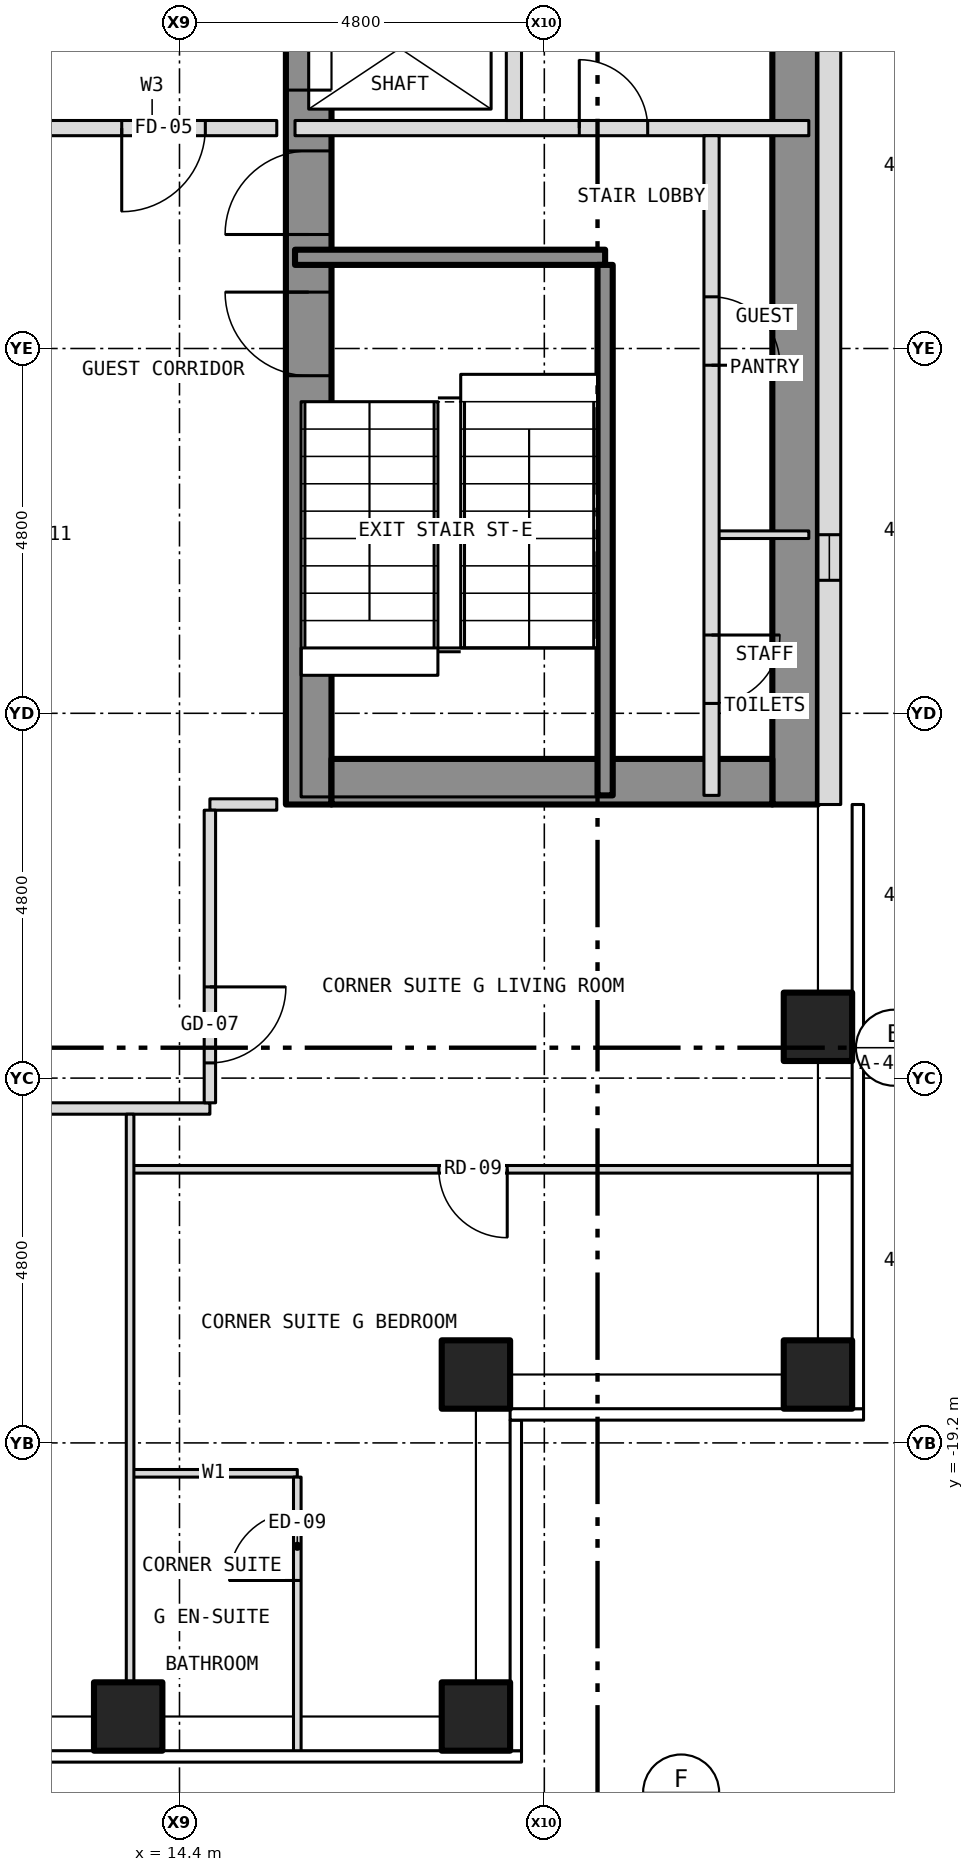
"""IFC4 building model, lengths in metres.
Left out: names, types, materials, properties, quantities, classifications, styles, units other than length and angle.
Written with IfcOpenShell. Run it as: python <this file> out.ifc"""

import sys

from ifc_helpers import new_model, si_unit, direction, frame, frame_2d, origin, origin_2d, place, context, subcontext, project, spatial, rectangle, hollow_rectangle, extrude, element, fill, save


model = new_model("IFC4")
c1 = context("Model", 3, precision=1e-05, world=origin(), true_north=direction((0.0, 1.0)))
c2 = subcontext(c1, "Body", "Model", "MODEL_VIEW")
j1 = project(units=[si_unit("LENGTHUNIT", "METRE"), si_unit("PLANEANGLEUNIT", "RADIAN")], contexts=[c1])
p1 = place(None, origin())
s1 = spatial("IfcSite", under=j1, at=p1, CompositionType="ELEMENT")
p2 = place(p1, origin())
s2 = spatial("IfcBuilding", under=s1, at=p2, CompositionType="ELEMENT")
p3 = place(p2, frame((0.0, 0.0, 117.0)))
s3 = spatial("IfcBuildingStorey", under=s2, at=p3, CompositionType="ELEMENT", Elevation=117.0)
for number, where, z_axis, x_axis in (
    (1, (13.725, -22.8, -0.15), (0.0, 0.0, 1.0), (1.0, 0.0, 0.0)),
    (2, (18.3, -22.8, -0.15), (0.0, 0.0, 1.0), (1.0, 0.0, 0.0)),
    (3, (22.8, -18.3, -0.15), (0.0, 0.0, 1.0), (1.0, 0.0, 0.0)),
    (4, (22.8, -13.725, -0.15), (0.0, 0.0, 1.0), (1.0, 0.0, 0.0)),
    (5, (18.3, -18.3, -0.15), (0.0, 0.0, 1.0), (1.0, 0.0, 0.0)),
):
    element("IfcColumn", number, at=place(p3, frame(where, z_axis=z_axis, x_axis=x_axis)), inside=s3, PredefinedType="COLUMN", context=c2, shape_type="SweptSolid", body=[
        extrude(hollow_rectangle(XDim=0.9, YDim=0.9, WallThickness=0.05, at=origin_2d()), origin(), (0.0, 0.0, 1.0), 3.5),
    ])
p4 = place(p3, frame((16.1, -10.8, 0.0), z_axis=(0.0, 0.0, 1.0), x_axis=(0.0, 1.0, 0.0)))
e6 = element("IfcWall", 6, at=p4, inside=s3, PredefinedType="SHEAR", context=c2, shape_type="SweptSolid", body=[
    extrude(rectangle(XDim=21.6, YDim=0.6, at=frame_2d((10.8, 0.0))), origin(), (0.0, 0.0, 1.0), 3.25),
])
p5 = place(p4, frame((9.4, 0.0, 0.0)))
e7 = element("IfcOpeningElement", 7, at=p5, cuts=e6, PredefinedType="OPENING", context=c2, shape_type="SweptSolid", body=[
    extrude(rectangle(XDim=1.1, YDim=2.1, at=frame_2d((0.55, 1.05))), frame((0.0, 0.312, 0.0), z_axis=(0.0, -1.0, 0.0), x_axis=(1.0, 0.0, 0.0)), (0.0, 0.0, 1.0), 0.624),
])
p6 = place(p4, frame((11.5, 0.0, 0.0)))
e8 = element("IfcOpeningElement", 8, at=p6, cuts=e6, PredefinedType="OPENING", context=c2, shape_type="SweptSolid", body=[
    extrude(rectangle(XDim=1.1, YDim=2.1, at=frame_2d((0.55, 1.05))), frame((0.0, 0.312, 0.0), z_axis=(0.0, -1.0, 0.0), x_axis=(1.0, 0.0, 0.0)), (0.0, 0.0, 1.0), 0.624),
])
p7 = place(p4, frame((13.6, 0.0, 0.0)))
e9 = element("IfcOpeningElement", 9, at=p7, cuts=e6, PredefinedType="OPENING", context=c2, shape_type="SweptSolid", body=[
    extrude(rectangle(XDim=1.1, YDim=2.1, at=frame_2d((0.55, 1.05))), frame((0.0, 0.312, 0.0), z_axis=(0.0, -1.0, 0.0), x_axis=(1.0, 0.0, 0.0)), (0.0, 0.0, 1.0), 0.624),
])
p8 = place(p4, frame((15.7, 0.0, 0.0)))
e10 = element("IfcOpeningElement", 10, at=p8, cuts=e6, PredefinedType="OPENING", context=c2, shape_type="SweptSolid", body=[
    extrude(rectangle(XDim=1.1, YDim=2.1, at=frame_2d((0.55, 1.05))), frame((0.0, 0.312, 0.0), z_axis=(0.0, -1.0, 0.0), x_axis=(1.0, 0.0, 0.0)), (0.0, 0.0, 1.0), 0.624),
])
p9 = place(p4, frame((17.8, 0.0, 0.0)))
e11 = element("IfcOpeningElement", 11, at=p9, cuts=e6, PredefinedType="OPENING", context=c2, shape_type="SweptSolid", body=[
    extrude(rectangle(XDim=1.1, YDim=2.1, at=frame_2d((0.55, 1.05))), frame((0.0, 0.312, 0.0), z_axis=(0.0, -1.0, 0.0), x_axis=(1.0, 0.0, 0.0)), (0.0, 0.0, 1.0), 0.624),
])
p10 = place(p4, frame((5.642, 0.0, 0.0)))
e12 = element("IfcOpeningElement", 12, at=p10, cuts=e6, PredefinedType="OPENING", context=c2, shape_type="SweptSolid", body=[
    extrude(rectangle(XDim=1.1, YDim=2.1, at=frame_2d((0.55, 1.05))), frame((0.0, 0.312, 0.0), z_axis=(0.0, -1.0, 0.0), x_axis=(1.0, 0.0, 0.0)), (0.0, 0.0, 1.0), 0.624),
])
p11 = place(p4, frame((7.5, 0.0, 0.0)))
e13 = element("IfcOpeningElement", 13, at=p11, cuts=e6, PredefinedType="OPENING", context=c2, shape_type="SweptSolid", body=[
    extrude(rectangle(XDim=1.1, YDim=2.1, at=frame_2d((0.55, 1.05))), frame((0.0, 0.312, 0.0), z_axis=(0.0, -1.0, 0.0), x_axis=(1.0, 0.0, 0.0)), (0.0, 0.0, 1.0), 0.624),
])
p12 = place(p3, frame((22.5, -10.8, 0.0), z_axis=(0.0, 0.0, 1.0), x_axis=(0.0, 1.0, 0.0)))
e14 = element("IfcWall", 14, at=p12, inside=s3, PredefinedType="SHEAR", context=c2, shape_type="SweptSolid", body=[
    extrude(rectangle(XDim=21.6, YDim=0.6, at=frame_2d((10.8, 0.0))), origin(), (0.0, 0.0, 1.0), 3.25),
])
p13 = place(p3, frame((16.4, -10.5, 0.0), z_axis=(0.0, 0.0, 1.0), x_axis=(1.0, 0.0, 0.0)))
e15 = element("IfcWall", 15, at=p13, inside=s3, PredefinedType="SHEAR", context=c2, shape_type="SweptSolid", body=[
    extrude(rectangle(XDim=5.8, YDim=0.6, at=frame_2d((2.9, 0.0))), origin(), (0.0, 0.0, 1.0), 3.25),
])
p14 = place(p3, frame((22.95, -10.8, 0.0), z_axis=(0.0, 0.0, 1.0), x_axis=(0.0, 1.0, 0.0)))
e16 = element("IfcWall", 16, at=p14, inside=s3, PredefinedType="SOLIDWALL", context=c2, shape_type="SweptSolid", body=[
    extrude(rectangle(XDim=21.6, YDim=0.3, at=frame_2d((10.8, 0.0))), origin(), (0.0, 0.0, 1.0), 3.5),
])
p15 = place(p14, frame((2.95, 0.0, 1.0)))
e17 = element("IfcOpeningElement", 17, at=p15, cuts=e16, PredefinedType="OPENING", context=c2, shape_type="SweptSolid", body=[
    extrude(rectangle(XDim=0.6, YDim=1.5, at=frame_2d((0.3, 0.75))), frame((0.0, 0.162, 0.0), z_axis=(0.0, -1.0, 0.0), x_axis=(1.0, 0.0, 0.0)), (0.0, 0.0, 1.0), 0.324),
])
p16 = place(p3, frame((13.75, -19.6, 0.0), z_axis=(0.0, 0.0, 1.0), x_axis=(1.0, 0.0, 0.0)))
e18 = element("IfcWall", 18, at=p16, inside=s3, PredefinedType="PARTITIONING", context=c2, shape_type="SweptSolid", body=[
    extrude(rectangle(XDim=2.2, YDim=0.1, at=frame_2d((1.1, 0.0))), origin(), (0.0, 0.0, 1.0), 3.35),
])
p17 = place(p3, frame((13.75, -15.6, 0.0), z_axis=(0.0, 0.0, 1.0), x_axis=(1.0, 0.0, 0.0)))
e19 = element("IfcWall", 19, at=p17, inside=s3, PredefinedType="PARTITIONING", context=c2, shape_type="SweptSolid", body=[
    extrude(rectangle(XDim=9.53, YDim=0.1, at=frame_2d((4.765, 0.0))), origin(), (0.0, 0.0, 1.0), 3.35),
])
p18 = place(p17, frame((4.062, 0.0, 0.0)))
e20 = element("IfcOpeningElement", 20, at=p18, cuts=e19, PredefinedType="OPENING", context=c2, shape_type="SweptSolid", body=[
    extrude(rectangle(XDim=0.9, YDim=2.1, at=frame_2d((0.45, 1.05))), frame((0.0, 0.062, 0.0), z_axis=(0.0, -1.0, 0.0), x_axis=(1.0, 0.0, 0.0)), (0.0, 0.0, 1.0), 0.124),
])
p19 = place(p3, frame((7.95, -14.8, 0.0), z_axis=(0.0, 0.0, 1.0), x_axis=(1.0, 0.0, 0.0)))
e21 = element("IfcWall", 21, at=p19, inside=s3, PredefinedType="PARTITIONING", context=c2, shape_type="SweptSolid", body=[
    extrude(rectangle(XDim=6.85, YDim=0.15, at=frame_2d((3.425, 0.0))), origin(), (0.0, 0.0, 1.0), 3.35),
])
p20 = place(p19, frame((3.487, 0.0, 0.0)))
e22 = element("IfcOpeningElement", 22, at=p20, cuts=e21, PredefinedType="OPENING", context=c2, shape_type="SweptSolid", body=[
    extrude(rectangle(XDim=1.0, YDim=2.1, at=frame_2d((0.5, 1.05))), frame((0.0, 0.087, 0.0), z_axis=(0.0, -1.0, 0.0), x_axis=(1.0, 0.0, 0.0)), (0.0, 0.0, 1.0), 0.174),
])
p21 = place(p3, frame((14.8, -10.8, 0.0), z_axis=(0.0, 0.0, 1.0), x_axis=(1.0, 0.0, 0.0)))
e23 = element("IfcWall", 23, at=p21, inside=s3, PredefinedType="PARTITIONING", context=c2, shape_type="SweptSolid", body=[
    extrude(rectangle(XDim=0.88, YDim=0.15, at=frame_2d((0.44, 0.0))), origin(), (0.0, 0.0, 1.0), 3.35),
])
p22 = place(p3, frame((21.4, -7.25, 0.0), z_axis=(0.0, 0.0, 1.0), x_axis=(1.0, 0.0, 0.0)))
e24 = element("IfcWall", 24, at=p22, inside=s3, PredefinedType="PARTITIONING", context=c2, shape_type="SweptSolid", body=[
    extrude(rectangle(XDim=1.28, YDim=0.1, at=frame_2d((0.64, 0.0))), origin(), (0.0, 0.0, 1.0), 3.25),
])
p23 = place(p3, frame((15.92, -3.6, 0.0), z_axis=(0.0, 0.0, 1.0), x_axis=(1.0, 0.0, 0.0)))
e25 = element("IfcWall", 25, at=p23, inside=s3, PredefinedType="SHEAR", context=c2, shape_type="SweptSolid", body=[
    extrude(rectangle(XDim=4.08, YDim=0.2, at=frame_2d((2.04, 0.0))), origin(), (0.0, 0.0, 1.0), 3.25),
])
p24 = place(p3, frame((12.4, -1.9, 0.0), z_axis=(0.0, 0.0, 1.0), x_axis=(1.0, 0.0, 0.0)))
e26 = element("IfcWall", 26, at=p24, inside=s3, PredefinedType="PARTITIONING", context=c2, shape_type="SweptSolid", body=[
    extrude(rectangle(XDim=3.28, YDim=0.2, at=frame_2d((1.64, 0.0))), origin(), (0.0, 0.0, 1.0), 3.35),
])
p25 = place(p24, frame((1.24, 0.0, 0.0)))
e27 = element("IfcOpeningElement", 27, at=p25, cuts=e26, PredefinedType="OPENING", context=c2, shape_type="SweptSolid", body=[
    extrude(rectangle(XDim=1.1, YDim=2.1, at=frame_2d((0.55, 1.05))), frame((0.0, 0.112, 0.0), z_axis=(0.0, -1.0, 0.0), x_axis=(1.0, 0.0, 0.0)), (0.0, 0.0, 1.0), 0.224),
])
p26 = place(p3, frame((15.92, -1.9, 0.0), z_axis=(0.0, 0.0, 1.0), x_axis=(1.0, 0.0, 0.0)))
e28 = element("IfcWall", 28, at=p26, inside=s3, PredefinedType="PARTITIONING", context=c2, shape_type="SweptSolid", body=[
    extrude(rectangle(XDim=6.76, YDim=0.2, at=frame_2d((3.38, 0.0))), origin(), (0.0, 0.0, 1.0), 3.25),
])
p27 = place(p26, frame((3.74, 0.0, 0.0)))
e29 = element("IfcOpeningElement", 29, at=p27, cuts=e28, PredefinedType="OPENING", context=c2, shape_type="SweptSolid", body=[
    extrude(rectangle(XDim=0.9, YDim=2.1, at=frame_2d((0.45, 1.05))), frame((0.0, 0.112, 0.0), z_axis=(0.0, -1.0, 0.0), x_axis=(1.0, 0.0, 0.0)), (0.0, 0.0, 1.0), 0.224),
])
p28 = place(p3, frame((13.75, -22.68, 0.0), z_axis=(0.0, 0.0, 1.0), x_axis=(0.0, 1.0, 0.0)))
e30 = element("IfcWall", 30, at=p28, inside=s3, PredefinedType="PARTITIONING", context=c2, shape_type="SweptSolid", body=[
    extrude(rectangle(XDim=7.805, YDim=0.1, at=frame_2d((3.902, 0.0))), origin(), (0.0, 0.0, 1.0), 3.35),
])
p29 = place(p3, frame((14.8, -14.725, 0.0), z_axis=(0.0, 0.0, 1.0), x_axis=(0.0, 1.0, 0.0)))
e31 = element("IfcWall", 31, at=p29, inside=s3, PredefinedType="PARTITIONING", context=c2, shape_type="SweptSolid", body=[
    extrude(rectangle(XDim=3.85, YDim=0.15, at=frame_2d((1.925, 0.0))), origin(), (0.0, 0.0, 1.0), 3.35),
])
p30 = place(p29, frame((0.525, 0.0, 0.0)))
e32 = element("IfcOpeningElement", 32, at=p30, cuts=e31, PredefinedType="OPENING", context=c2, shape_type="SweptSolid", body=[
    extrude(rectangle(XDim=1.0, YDim=2.1, at=frame_2d((0.5, 1.05))), frame((0.0, 0.087, 0.0), z_axis=(0.0, -1.0, 0.0), x_axis=(1.0, 0.0, 0.0)), (0.0, 0.0, 1.0), 0.174),
])
p31 = place(p3, frame((15.95, -23.28, 0.0), z_axis=(0.0, 0.0, 1.0), x_axis=(0.0, 1.0, 0.0)))
e33 = element("IfcWall", 33, at=p31, inside=s3, PredefinedType="PARTITIONING", context=c2, shape_type="SweptSolid", body=[
    extrude(rectangle(XDim=3.63, YDim=0.1, at=frame_2d((1.815, 0.0))), origin(), (0.0, 0.0, 1.0), 3.35),
])
p32 = place(p31, frame((2.27, 0.0, 0.0)))
e34 = element("IfcOpeningElement", 34, at=p32, cuts=e33, PredefinedType="OPENING", context=c2, shape_type="SweptSolid", body=[
    extrude(rectangle(XDim=0.9, YDim=2.1, at=frame_2d((0.45, 1.05))), frame((0.0, 0.062, 0.0), z_axis=(0.0, -1.0, 0.0), x_axis=(1.0, 0.0, 0.0)), (0.0, 0.0, 1.0), 0.124),
])
p33 = place(p3, frame((18.8, -1.8, 0.0), z_axis=(0.0, 0.0, 1.0), x_axis=(0.0, 1.0, 0.0)))
e35 = element("IfcWall", 35, at=p33, inside=s3, PredefinedType="PARTITIONING", context=c2, shape_type="SweptSolid", body=[
    extrude(rectangle(XDim=12.48, YDim=0.2, at=frame_2d((6.24, 0.0))), origin(), (0.0, 0.0, 1.0), 3.25),
])
p34 = place(p3, frame((20.0, -10.68, 0.0), z_axis=(0.0, 0.0, 1.0), x_axis=(0.0, 1.0, 0.0)))
e36 = element("IfcWall", 36, at=p34, inside=s3, PredefinedType="SHEAR", context=c2, shape_type="SweptSolid", body=[
    extrude(rectangle(XDim=6.98, YDim=0.2, at=frame_2d((3.49, 0.0))), origin(), (0.0, 0.0, 1.0), 3.25),
])
p35 = place(p3, frame((21.4, -10.68, 0.0), z_axis=(0.0, 0.0, 1.0), x_axis=(0.0, 1.0, 0.0)))
e37 = element("IfcWall", 37, at=p35, inside=s3, PredefinedType="PARTITIONING", context=c2, shape_type="SweptSolid", body=[
    extrude(rectangle(XDim=8.68, YDim=0.2, at=frame_2d((4.34, 0.0))), origin(), (0.0, 0.0, 1.0), 3.25),
])
p36 = place(p35, frame((1.21, 0.0, 0.0)))
e38 = element("IfcOpeningElement", 38, at=p36, cuts=e37, PredefinedType="OPENING", context=c2, shape_type="SweptSolid", body=[
    extrude(rectangle(XDim=0.9, YDim=2.1, at=frame_2d((0.45, 1.05))), frame((0.0, 0.112, 0.0), z_axis=(0.0, -1.0, 0.0), x_axis=(1.0, 0.0, 0.0)), (0.0, 0.0, 1.0), 0.224),
])
p37 = place(p35, frame((5.66, 0.0, 0.0)))
e39 = element("IfcOpeningElement", 39, at=p37, cuts=e37, PredefinedType="OPENING", context=c2, shape_type="SweptSolid", body=[
    extrude(rectangle(XDim=0.9, YDim=2.1, at=frame_2d((0.45, 1.05))), frame((0.0, 0.112, 0.0), z_axis=(0.0, -1.0, 0.0), x_axis=(1.0, 0.0, 0.0)), (0.0, 0.0, 1.0), 0.224),
])
p38 = place(p15, origin())
e40 = element("IfcWindow", 40, at=p38, inside=s3, PartitioningType="SINGLE_PANEL", PredefinedType="WINDOW", context=c2, shape_type="SweptSolid", body=[
    extrude(rectangle(XDim=0.6, YDim=1.5, at=frame_2d((0.3, 0.75))), frame((0.0, -0.06, 0.0), z_axis=(0.0, -1.0, 0.0), x_axis=(1.0, 0.0, 0.0)), (0.0, 0.0, 1.0), 0.06),
])
fill(e17, e40)
p39 = place(p5, origin())
e41 = element("IfcDoor", 41, at=p39, inside=s3, OperationType="SLIDING_TO_LEFT", PredefinedType="DOOR", context=c2, shape_type="SweptSolid", body=[
    extrude(rectangle(XDim=1.1, YDim=2.1, at=frame_2d((0.55, 1.05))), frame((0.0, 0.025, 0.0), z_axis=(0.0, -1.0, 0.0), x_axis=(1.0, 0.0, 0.0)), (0.0, 0.0, 1.0), 0.05),
])
fill(e7, e41)
p40 = place(p10, origin())
e42 = element("IfcDoor", 42, at=p40, inside=s3, OperationType="SINGLE_SWING_RIGHT", PredefinedType="DOOR", context=c2, shape_type="SweptSolid", body=[
    extrude(rectangle(XDim=1.1, YDim=2.1, at=frame_2d((0.55, 1.05))), frame((0.0, 0.025, 0.0), z_axis=(0.0, -1.0, 0.0), x_axis=(1.0, 0.0, 0.0)), (0.0, 0.0, 1.0), 0.05),
])
fill(e12, e42)
p41 = place(p11, origin())
e43 = element("IfcDoor", 43, at=p41, inside=s3, OperationType="SINGLE_SWING_LEFT", PredefinedType="DOOR", context=c2, shape_type="SweptSolid", body=[
    extrude(rectangle(XDim=1.1, YDim=2.1, at=frame_2d((0.55, 1.05))), frame((0.0, 0.025, 0.0), z_axis=(0.0, -1.0, 0.0), x_axis=(1.0, 0.0, 0.0)), (0.0, 0.0, 1.0), 0.05),
])
fill(e13, e43)
p42 = place(p36, origin())
e44 = element("IfcDoor", 44, at=p42, inside=s3, OperationType="SINGLE_SWING_RIGHT", PredefinedType="DOOR", context=c2, shape_type="SweptSolid", body=[
    extrude(rectangle(XDim=0.9, YDim=2.1, at=frame_2d((0.45, 1.05))), frame((0.0, 0.025, 0.0), z_axis=(0.0, -1.0, 0.0), x_axis=(1.0, 0.0, 0.0)), (0.0, 0.0, 1.0), 0.05),
])
fill(e38, e44)
p43 = place(p37, origin())
e45 = element("IfcDoor", 45, at=p43, inside=s3, OperationType="SINGLE_SWING_LEFT", PredefinedType="DOOR", context=c2, shape_type="SweptSolid", body=[
    extrude(rectangle(XDim=0.9, YDim=2.1, at=frame_2d((0.45, 1.05))), frame((0.0, 0.025, 0.0), z_axis=(0.0, -1.0, 0.0), x_axis=(1.0, 0.0, 0.0)), (0.0, 0.0, 1.0), 0.05),
])
fill(e39, e45)
p44 = place(p27, origin())
e46 = element("IfcDoor", 46, at=p44, inside=s3, OperationType="SINGLE_SWING_LEFT", PredefinedType="DOOR", context=c2, shape_type="SweptSolid", body=[
    extrude(rectangle(XDim=0.9, YDim=2.1, at=frame_2d((0.45, 1.05))), frame((0.0, 0.025, 0.0), z_axis=(0.0, -1.0, 0.0), x_axis=(1.0, 0.0, 0.0)), (0.0, 0.0, 1.0), 0.05),
])
fill(e29, e46)
p45 = place(p25, origin())
e47 = element("IfcDoor", 47, at=p45, inside=s3, OperationType="SINGLE_SWING_LEFT", PredefinedType="DOOR", context=c2, shape_type="SweptSolid", body=[
    extrude(rectangle(XDim=1.1, YDim=2.1, at=frame_2d((0.55, 1.05))), frame((0.0, 0.025, 0.0), z_axis=(0.0, -1.0, 0.0), x_axis=(1.0, 0.0, 0.0)), (0.0, 0.0, 1.0), 0.05),
])
fill(e27, e47)
p46 = place(p30, origin())
e48 = element("IfcDoor", 48, at=p46, inside=s3, OperationType="SINGLE_SWING_RIGHT", PredefinedType="DOOR", context=c2, shape_type="SweptSolid", body=[
    extrude(rectangle(XDim=1.0, YDim=2.1, at=frame_2d((0.5, 1.05))), frame((0.0, 0.025, 0.0), z_axis=(0.0, -1.0, 0.0), x_axis=(1.0, 0.0, 0.0)), (0.0, 0.0, 1.0), 0.05),
])
fill(e32, e48)
p47 = place(p18, origin())
e49 = element("IfcDoor", 49, at=p47, inside=s3, OperationType="SINGLE_SWING_RIGHT", PredefinedType="DOOR", context=c2, shape_type="SweptSolid", body=[
    extrude(rectangle(XDim=0.9, YDim=2.1, at=frame_2d((0.45, 1.05))), frame((0.0, 0.025, 0.0), z_axis=(0.0, -1.0, 0.0), x_axis=(1.0, 0.0, 0.0)), (0.0, 0.0, 1.0), 0.05),
])
fill(e20, e49)
p48 = place(p32, origin())
e50 = element("IfcDoor", 50, at=p48, inside=s3, OperationType="SINGLE_SWING_LEFT", PredefinedType="DOOR", context=c2, shape_type="SweptSolid", body=[
    extrude(rectangle(XDim=0.9, YDim=2.1, at=frame_2d((0.45, 1.05))), frame((0.0, 0.025, 0.0), z_axis=(0.0, -1.0, 0.0), x_axis=(1.0, 0.0, 0.0)), (0.0, 0.0, 1.0), 0.05),
])
fill(e34, e50)
save(model, sys.argv[1])
